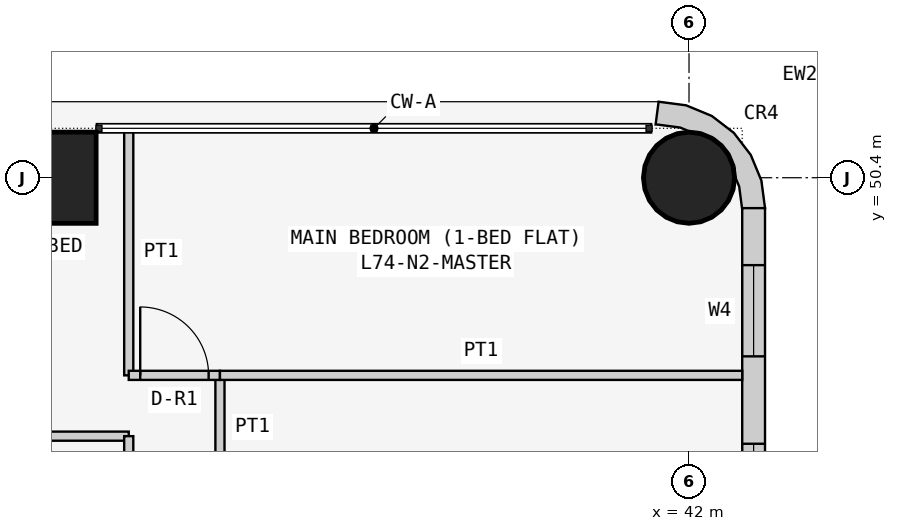
"""IFC4 building model, lengths in metres.
Left out: names, types, materials, properties, quantities, classifications, styles, units other than length and angle.
Written with IfcOpenShell. Run it as: python <this file> out.ifc"""

import sys

from ifc_helpers import new_model, si_unit, direction, frame, frame_2d, origin, origin_2d, place, context, subcontext, project, spatial, polyline, rectangle, circle, outline, extrude, element, fill, save


model = new_model("IFC4")
c1 = context("Model", 3, precision=1e-05, world=origin(), true_north=direction((0.0, 1.0)))
c2 = subcontext(c1, "Body", "Model", "MODEL_VIEW")
j1 = project(units=[si_unit("LENGTHUNIT", "METRE"), si_unit("PLANEANGLEUNIT", "RADIAN")], contexts=[c1])
p1 = place(None, origin())
s1 = spatial("IfcSite", under=j1, at=p1, CompositionType="ELEMENT")
p2 = place(p1, origin())
s2 = spatial("IfcBuilding", under=s1, at=p2, CompositionType="ELEMENT")
p3 = place(p2, frame((0.0, 0.0, 282.9)))
s3 = spatial("IfcBuildingStorey", under=s2, at=p3, CompositionType="ELEMENT", Elevation=282.9)
p4 = place(p3, frame((33.6, 50.4, 0.0), z_axis=(0.0, 0.0, 1.0), x_axis=(1.0, 0.0, 0.0)))
e1 = element("IfcColumn", 1, at=p4, inside=s3, PredefinedType="COLUMN", context=c2, shape_type="SweptSolid", body=[
    extrude(rectangle(XDim=1.2, YDim=1.2, at=origin_2d()), origin(), (0.0, 0.0, 1.0), 3.6),
])
p5 = place(p3, frame((42.0, 50.4, 0.0), z_axis=(0.0, 0.0, 1.0), x_axis=(1.0, 0.0, 0.0)))
e2 = element("IfcColumn", 2, at=p5, inside=s3, PredefinedType="COLUMN", context=c2, shape_type="SweptSolid", body=[
    extrude(circle(Radius=0.6, at=origin_2d()), origin(), (0.0, 0.0, 1.0), 3.6),
])
p6 = place(p3, frame((42.85, 43.0, 0.0), z_axis=(0.0, 0.0, 1.0), x_axis=(0.0, 1.0, 0.0)))
e3 = element("IfcWall", 3, at=p6, inside=s3, PredefinedType="SOLIDWALL", context=c2, shape_type="SweptSolid", body=[
    extrude(rectangle(XDim=7.0, YDim=0.3, at=frame_2d((3.5, 0.0))), origin(), (0.0, 0.0, 1.0), 3.45),
])
p7 = place(p6, frame((1.5, 0.0, 0.9)))
e4 = element("IfcOpeningElement", 4, at=p7, cuts=e3, PredefinedType="OPENING", context=c2, shape_type="SweptSolid", body=[
    extrude(rectangle(XDim=2.4, YDim=1.5, at=frame_2d((1.2, 0.75))), frame((0.0, 0.16, 0.0), z_axis=(0.0, -1.0, 0.0), x_axis=(1.0, 0.0, 0.0)), (0.0, 0.0, 1.0), 0.32),
])
p8 = place(p6, frame((5.05, 0.0, 0.9)))
e5 = element("IfcOpeningElement", 5, at=p8, cuts=e3, PredefinedType="OPENING", context=c2, shape_type="SweptSolid", body=[
    extrude(rectangle(XDim=1.2, YDim=1.5, at=frame_2d((0.6, 0.75))), frame((0.0, 0.16, 0.0), z_axis=(0.0, -1.0, 0.0), x_axis=(1.0, 0.0, 0.0)), (0.0, 0.0, 1.0), 0.32),
])
p9 = place(p3, frame((42.576, 50.038, 0.0), z_axis=(0.0, 0.0, 1.0), x_axis=(0.707106781187, 0.707106781187, 0.0)))
e6 = element("IfcWall", 6, at=p9, inside=s3, PredefinedType="SOLIDWALL", context=c2, shape_type="SweptSolid", body=[
    extrude(outline(polyline([(0.233, 0.114), (0.047, -0.129), (0.033, -0.143), (0.273, -0.327), (0.495, -0.037), (0.635, 0.3), (0.683, 0.663), (0.635, 1.025), (0.495, 1.363), (0.273, 1.653), (0.033, 1.469), (0.047, 1.455), (0.233, 1.212), (0.292, 1.069), (0.358, 1.003), (0.449, 0.782), (0.449, 0.543), (0.358, 0.322), (0.292, 0.257), (0.233, 0.114)])), origin(), (0.0, 0.0, 1.0), 3.45),
])
p10 = place(p3, frame((29.4, 47.0, 0.0), z_axis=(0.0, 0.0, 1.0), x_axis=(1.0, 0.0, 0.0)))
e7 = element("IfcWall", 7, at=p10, inside=s3, PredefinedType="PARTITIONING", context=c2, shape_type="SweptSolid", body=[
    extrude(rectangle(XDim=5.229, YDim=0.12, at=frame_2d((2.615, 0.0))), origin(), (0.0, 0.0, 1.0), 3.45),
])
p11 = place(p3, frame((34.629, 47.0, 0.0), z_axis=(0.0, 0.0, 1.0), x_axis=(0.0, -1.0, 0.0)))
e8 = element("IfcWall", 8, at=p11, inside=s3, PredefinedType="PARTITIONING", context=c2, shape_type="SweptSolid", body=[
    extrude(rectangle(XDim=2.0, YDim=0.12, at=frame_2d((1.0, 0.0))), origin(), (0.0, 0.0, 1.0), 3.45),
])
p12 = place(p11, frame((0.55, 0.0, 0.0)))
e9 = element("IfcOpeningElement", 9, at=p12, cuts=e8, PredefinedType="OPENING", context=c2, shape_type="SweptSolid", body=[
    extrude(rectangle(XDim=0.9, YDim=2.1, at=frame_2d((0.45, 1.05))), frame((0.0, 0.07, 0.0), z_axis=(0.0, -1.0, 0.0), x_axis=(1.0, 0.0, 0.0)), (0.0, 0.0, 1.0), 0.14),
])
p13 = place(p3, frame((35.829, 47.8, 0.0), z_axis=(0.0, 0.0, 1.0), x_axis=(0.0, -1.0, 0.0)))
e10 = element("IfcWall", 10, at=p13, inside=s3, PredefinedType="PARTITIONING", context=c2, shape_type="SweptSolid", body=[
    extrude(rectangle(XDim=3.4, YDim=0.12, at=frame_2d((1.7, 0.0))), origin(), (0.0, 0.0, 1.0), 3.45),
])
p14 = place(p13, frame((1.25, 0.0, 0.0)))
e11 = element("IfcOpeningElement", 11, at=p14, cuts=e10, PredefinedType="OPENING", context=c2, shape_type="SweptSolid", body=[
    extrude(rectangle(XDim=0.9, YDim=2.1, at=frame_2d((0.45, 1.05))), frame((0.0, 0.07, 0.0), z_axis=(0.0, -1.0, 0.0), x_axis=(1.0, 0.0, 0.0)), (0.0, 0.0, 1.0), 0.14),
])
p15 = place(p3, frame((34.629, 51.05, 0.0), z_axis=(0.0, 0.0, 1.0), x_axis=(0.0, -1.0, 0.0)))
e12 = element("IfcWall", 12, at=p15, inside=s3, PredefinedType="PARTITIONING", context=c2, shape_type="SweptSolid", body=[
    extrude(rectangle(XDim=3.25, YDim=0.12, at=frame_2d((1.625, 0.0))), origin(), (0.0, 0.0, 1.0), 3.45),
])
p16 = place(p3, frame((34.629, 47.8, 0.0), z_axis=(0.0, 0.0, 1.0), x_axis=(1.0, 0.0, 0.0)))
e13 = element("IfcWall", 13, at=p16, inside=s3, PredefinedType="PARTITIONING", context=c2, shape_type="SweptSolid", body=[
    extrude(rectangle(XDim=1.2, YDim=0.12, at=frame_2d((0.6, 0.0))), origin(), (0.0, 0.0, 1.0), 3.45),
])
p17 = place(p16, frame((0.151, 0.0, 0.0)))
e14 = element("IfcOpeningElement", 14, at=p17, cuts=e13, PredefinedType="OPENING", context=c2, shape_type="SweptSolid", body=[
    extrude(rectangle(XDim=0.9, YDim=2.1, at=frame_2d((0.45, 1.05))), frame((0.0, 0.07, 0.0), z_axis=(0.0, -1.0, 0.0), x_axis=(1.0, 0.0, 0.0)), (0.0, 0.0, 1.0), 0.14),
])
p18 = place(p3, frame((35.829, 47.8, 0.0), z_axis=(0.0, 0.0, 1.0), x_axis=(1.0, 0.0, 0.0)))
e15 = element("IfcWall", 15, at=p18, inside=s3, PredefinedType="PARTITIONING", context=c2, shape_type="SweptSolid", body=[
    extrude(rectangle(XDim=6.871, YDim=0.12, at=frame_2d((3.436, 0.0))), origin(), (0.0, 0.0, 1.0), 3.45),
])
p19 = place(p7, origin())
e16 = element("IfcWindow", 16, at=p19, inside=s3, PartitioningType="SINGLE_PANEL", PredefinedType="WINDOW", context=c2, shape_type="SweptSolid", body=[
    extrude(rectangle(XDim=2.4, YDim=1.5, at=frame_2d((1.2, 0.75))), frame((0.0, 0.03, 0.0), z_axis=(0.0, -1.0, 0.0), x_axis=(1.0, 0.0, 0.0)), (0.0, 0.0, 1.0), 0.06),
])
fill(e4, e16)
p20 = place(p8, origin())
e17 = element("IfcWindow", 17, at=p20, inside=s3, PartitioningType="SINGLE_PANEL", PredefinedType="WINDOW", context=c2, shape_type="SweptSolid", body=[
    extrude(rectangle(XDim=1.2, YDim=1.5, at=frame_2d((0.6, 0.75))), frame((0.0, 0.03, 0.0), z_axis=(0.0, -1.0, 0.0), x_axis=(1.0, 0.0, 0.0)), (0.0, 0.0, 1.0), 0.06),
])
fill(e5, e17)
p21 = place(p17, origin())
e18 = element("IfcDoor", 18, at=p21, inside=s3, OperationType="SINGLE_SWING_LEFT", PredefinedType="DOOR", context=c2, shape_type="SweptSolid", body=[
    extrude(rectangle(XDim=0.9, YDim=2.1, at=frame_2d((0.45, 1.05))), frame((0.0, 0.025, 0.0), z_axis=(0.0, -1.0, 0.0), x_axis=(1.0, 0.0, 0.0)), (0.0, 0.0, 1.0), 0.05),
])
fill(e14, e18)
save(model, sys.argv[1])
